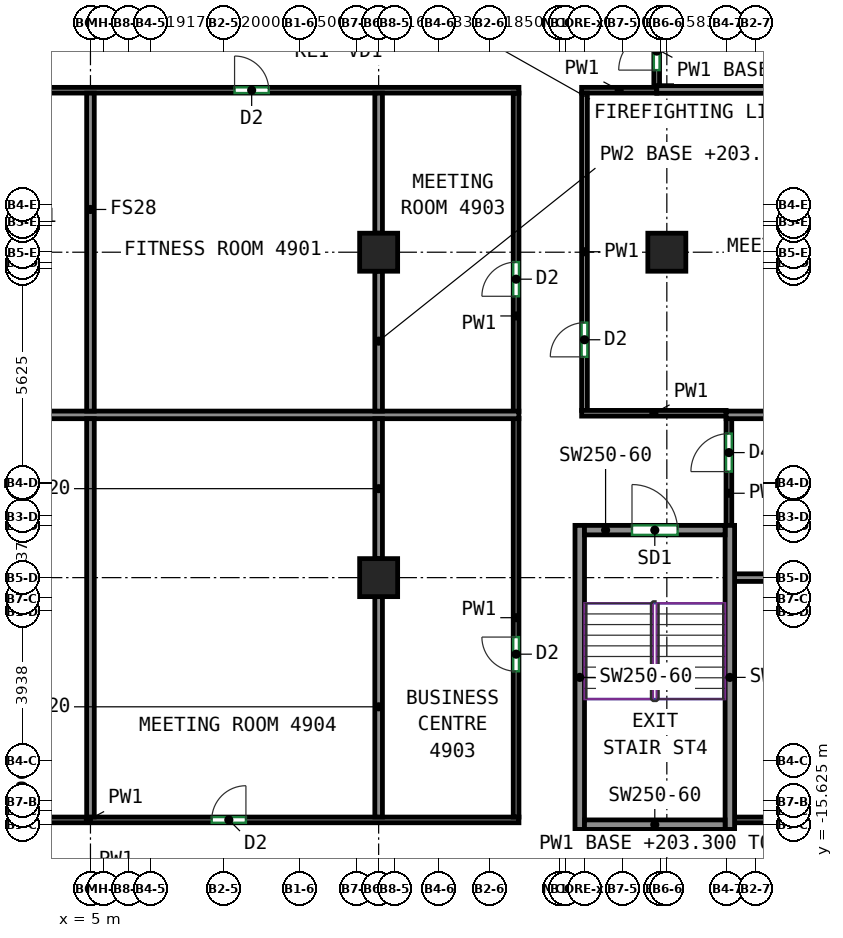
"""IFC4 building model, lengths in metres.
Left out: names, types, materials, properties, quantities, classifications, styles, units other than length and angle.
Written with IfcOpenShell. Run it as: python <this file> out.ifc"""

import sys

from ifc_helpers import new_model, si_unit, direction, frame, frame_2d, origin, origin_2d, place, context, subcontext, project, spatial, rectangle, extrude, source, transform, mapped, element, fill, save


model = new_model("IFC4")
c1 = context("Model", 3, precision=1e-05, world=origin(), true_north=direction((0.0, 1.0)))
c2 = subcontext(c1, "Body", "Model", "MODEL_VIEW")
j1 = project(units=[si_unit("LENGTHUNIT", "METRE"), si_unit("PLANEANGLEUNIT", "RADIAN")], contexts=[c1])
p1 = place(None, origin())
s1 = spatial("IfcSite", under=j1, at=p1, CompositionType="ELEMENT")
p2 = place(p1, origin())
s2 = spatial("IfcBuilding", under=s1, at=p2, CompositionType="ELEMENT")
p3 = place(p2, frame((0.0, 0.0, 203.3)))
s3 = spatial("IfcBuildingStorey", under=s2, at=p3, CompositionType="ELEMENT", Elevation=203.3)
m1 = source(origin(), c2, "Body", "SweptSolid", [
    extrude(rectangle(XDim=1.0, YDim=1.0, at=origin_2d()), origin(), (0.0, 0.0, 1.0), 3.12),
])
for number, where, z_axis, x_axis in (
    (1, (12.583, -9.125, 0.0), (0.0, 0.0, 1.0), (1.0, 0.0, 0.0)),
    (2, (12.583, -0.562, 0.0), (0.0, 0.0, 1.0), (1.0, 0.0, 0.0)),
    (3, (20.167, -0.562, 0.0), (0.0, 0.0, 1.0), (1.0, 0.0, 0.0)),
):
    element("IfcColumn", number, at=place(p3, frame(where, z_axis=z_axis, x_axis=x_axis)), inside=s3, PredefinedType="COLUMN", context=c2, shape_type="MappedRepresentation", body=[
        mapped(m1, transform((0.0, 0.0, 0.0))),
    ])
m2 = source(origin(), c2, "Body", "SweptSolid", [
    extrude(rectangle(XDim=8.0, YDim=0.25, at=frame_2d((4.0, 0.0))), origin(), (0.0, 0.0, 1.0), 3.12),
])
for number, where, z_axis, x_axis in (
    (4, (17.875, -15.75, 0.0), (0.0, 0.0, 1.0), (0.0, 1.0, 0.0)),
    (5, (21.825, -15.75, 0.0), (0.0, 0.0, 1.0), (0.0, 1.0, 0.0)),
):
    element("IfcWall", number, at=place(p3, frame(where, z_axis=z_axis, x_axis=x_axis)), inside=s3, PredefinedType="SHEAR", context=c2, shape_type="MappedRepresentation", body=[
        mapped(m2, transform((0.0, 0.0, 0.0))),
    ])
m3 = source(origin(), c2, "Body", "SweptSolid", [
    extrude(rectangle(XDim=3.7, YDim=0.25, at=frame_2d((1.85, 0.0))), origin(), (0.0, 0.0, 1.0), 3.12),
])
p4 = place(p3, frame((18.0, -15.625, 0.0), z_axis=(0.0, 0.0, 1.0), x_axis=(1.0, 0.0, 0.0)))
e6 = element("IfcWall", 6, at=p4, inside=s3, PredefinedType="SHEAR", context=c2, shape_type="MappedRepresentation", body=[
    mapped(m3, transform((0.0, 0.0, 0.0))),
])
p5 = place(p3, frame((18.0, -7.875, 0.0), z_axis=(0.0, 0.0, 1.0), x_axis=(1.0, 0.0, 0.0)))
e7 = element("IfcWall", 7, at=p5, inside=s3, PredefinedType="SHEAR", context=c2, shape_type="MappedRepresentation", body=[
    mapped(m3, transform((0.0, 0.0, 0.0))),
])
p6 = place(p5, frame((1.25, 0.0, 0.0)))
e8 = element("IfcOpeningElement", 8, at=p6, cuts=e7, PredefinedType="OPENING", context=c2, shape_type="SweptSolid", body=[
    extrude(rectangle(XDim=1.2, YDim=2.1, at=frame_2d((0.6, 1.05))), frame((0.0, 0.135, 0.0), z_axis=(0.0, -1.0, 0.0), x_axis=(1.0, 0.0, 0.0)), (0.0, 0.0, 1.0), 0.27),
])
p7 = place(p3, frame((19.9, 3.809, 0.0), z_axis=(0.0, 0.0, 1.0), x_axis=(0.0, 1.0, 0.0)))
e9 = element("IfcWall", 9, at=p7, inside=s3, PredefinedType="PARTITIONING", context=c2, shape_type="SweptSolid", body=[
    extrude(rectangle(XDim=1.951, YDim=0.15, at=frame_2d((0.976, 0.0))), origin(), (0.0, 0.0, 1.0), 2.52),
])
p8 = place(p7, frame((0.42, 0.0, 0.0)))
e10 = element("IfcOpeningElement", 10, at=p8, cuts=e9, PredefinedType="OPENING", context=c2, shape_type="SweptSolid", body=[
    extrude(rectangle(XDim=1.0, YDim=2.1, at=frame_2d((0.5, 1.05))), frame((0.0, 0.085, 0.0), z_axis=(0.0, -1.0, 0.0), x_axis=(1.0, 0.0, 0.0)), (0.0, 0.0, 1.0), 0.17),
])
p9 = place(p3, frame((17.925, 3.7, 0.0), z_axis=(0.0, 0.0, 1.0), x_axis=(1.0, 0.0, 0.0)))
e11 = element("IfcWall", 11, at=p9, inside=s3, PredefinedType="PARTITIONING", context=c2, shape_type="SweptSolid", body=[
    extrude(rectangle(XDim=1.975, YDim=0.15, at=frame_2d((0.987, 0.0))), origin(), (0.0, 0.0, 1.0), 3.12),
])
p10 = place(p3, frame((18.0, -4.725, 0.0), z_axis=(0.0, 0.0, 1.0), x_axis=(0.0, 1.0, 0.0)))
e12 = element("IfcWall", 12, at=p10, inside=s3, PredefinedType="PARTITIONING", context=c2, shape_type="SweptSolid", body=[
    extrude(rectangle(XDim=8.35, YDim=0.15, at=frame_2d((4.175, 0.0))), origin(), (0.0, 0.0, 1.0), 3.12),
])
p11 = place(p10, frame((1.409, 0.0, 0.0)))
e13 = element("IfcOpeningElement", 13, at=p11, cuts=e12, PredefinedType="OPENING", context=c2, shape_type="SweptSolid", body=[
    extrude(rectangle(XDim=0.9, YDim=2.1, at=frame_2d((0.45, 1.05))), frame((0.0, 0.085, 0.0), z_axis=(0.0, -1.0, 0.0), x_axis=(1.0, 0.0, 0.0)), (0.0, 0.0, 1.0), 0.17),
])
p12 = place(p3, frame((17.925, -4.8, 0.0), z_axis=(0.0, 0.0, 1.0), x_axis=(1.0, 0.0, 0.0)))
e14 = element("IfcWall", 14, at=p12, inside=s3, PredefinedType="PARTITIONING", context=c2, shape_type="SweptSolid", body=[
    extrude(rectangle(XDim=3.802, YDim=0.15, at=frame_2d((1.901, 0.0))), origin(), (0.0, 0.0, 1.0), 3.12),
])
p13 = place(p3, frame((21.8, -7.75, 0.0), z_axis=(0.0, 0.0, 1.0), x_axis=(0.0, 1.0, 0.0)))
e15 = element("IfcWall", 15, at=p13, inside=s3, PredefinedType="PARTITIONING", context=c2, shape_type="SweptSolid", body=[
    extrude(rectangle(XDim=2.817, YDim=0.15, at=frame_2d((1.408, 0.0))), origin(), (0.0, 0.0, 1.0), 3.12),
])
p14 = place(p13, frame((1.415, 0.0, 0.0)))
e16 = element("IfcOpeningElement", 16, at=p14, cuts=e15, PredefinedType="OPENING", context=c2, shape_type="SweptSolid", body=[
    extrude(rectangle(XDim=1.0, YDim=2.1, at=frame_2d((0.5, 1.05))), frame((0.0, 0.085, 0.0), z_axis=(0.0, -1.0, 0.0), x_axis=(1.0, 0.0, 0.0)), (0.0, 0.0, 1.0), 0.17),
])
p15 = place(p3, frame((21.95, -15.5, 0.0), z_axis=(0.0, 0.0, 1.0), x_axis=(1.0, 0.0, 0.0)))
e17 = element("IfcWall", 17, at=p15, inside=s3, PredefinedType="PARTITIONING", context=c2, shape_type="SweptSolid", body=[
    extrude(rectangle(XDim=5.875, YDim=0.15, at=frame_2d((2.938, 0.0))), origin(), (0.0, 0.0, 1.0), 3.12),
])
p16 = place(p15, frame((3.962, 0.0, 0.0)))
e18 = element("IfcOpeningElement", 18, at=p16, cuts=e17, PredefinedType="OPENING", context=c2, shape_type="SweptSolid", body=[
    extrude(rectangle(XDim=0.9, YDim=2.1, at=frame_2d((0.45, 1.05))), frame((0.0, 0.085, 0.0), z_axis=(0.0, -1.0, 0.0), x_axis=(1.0, 0.0, 0.0)), (0.0, 0.0, 1.0), 0.17),
])
p17 = place(p3, frame((-17.575, 3.7, 0.0), z_axis=(0.0, 0.0, 1.0), x_axis=(1.0, 0.0, 0.0)))
e19 = element("IfcWall", 19, at=p17, inside=s3, PredefinedType="PARTITIONING", context=c2, shape_type="SweptSolid", body=[
    extrude(rectangle(XDim=33.85, YDim=0.15, at=frame_2d((16.925, 0.0))), origin(), (0.0, 0.0, 1.0), 3.12),
])
p18 = place(p17, frame((10.0, 0.0, 0.0)))
e20 = element("IfcOpeningElement", 20, at=p18, cuts=e19, PredefinedType="OPENING", context=c2, shape_type="SweptSolid", body=[
    extrude(rectangle(XDim=0.9, YDim=2.1, at=frame_2d((0.45, 1.05))), frame((0.0, 0.085, 0.0), z_axis=(0.0, -1.0, 0.0), x_axis=(1.0, 0.0, 0.0)), (0.0, 0.0, 1.0), 0.17),
])
p19 = place(p17, frame((15.182, 0.0, 0.0)))
e21 = element("IfcOpeningElement", 21, at=p19, cuts=e19, PredefinedType="OPENING", context=c2, shape_type="SweptSolid", body=[
    extrude(rectangle(XDim=0.9, YDim=2.1, at=frame_2d((0.45, 1.05))), frame((0.0, 0.085, 0.0), z_axis=(0.0, -1.0, 0.0), x_axis=(1.0, 0.0, 0.0)), (0.0, 0.0, 1.0), 0.17),
])
p20 = place(p17, frame((26.367, 0.0, 0.0)))
e22 = element("IfcOpeningElement", 22, at=p20, cuts=e19, PredefinedType="OPENING", context=c2, shape_type="SweptSolid", body=[
    extrude(rectangle(XDim=0.9, YDim=2.1, at=frame_2d((0.45, 1.05))), frame((0.0, 0.085, 0.0), z_axis=(0.0, -1.0, 0.0), x_axis=(1.0, 0.0, 0.0)), (0.0, 0.0, 1.0), 0.17),
])
p21 = place(p3, frame((16.2, -4.753, 0.0), z_axis=(0.0, 0.0, 1.0), x_axis=(0.0, 1.0, 0.0)))
e23 = element("IfcWall", 23, at=p21, inside=s3, PredefinedType="PARTITIONING", context=c2, shape_type="SweptSolid", body=[
    extrude(rectangle(XDim=8.378, YDim=0.15, at=frame_2d((4.189, 0.0))), origin(), (0.0, 0.0, 1.0), 3.12),
])
p22 = place(p21, frame((3.031, 0.0, 0.0)))
e24 = element("IfcOpeningElement", 24, at=p22, cuts=e23, PredefinedType="OPENING", context=c2, shape_type="SweptSolid", body=[
    extrude(rectangle(XDim=0.9, YDim=2.1, at=frame_2d((0.45, 1.05))), frame((0.0, 0.085, 0.0), z_axis=(0.0, -1.0, 0.0), x_axis=(1.0, 0.0, 0.0)), (0.0, 0.0, 1.0), 0.17),
])
p23 = place(p3, frame((-6.385, -15.5, 0.0), z_axis=(0.0, 0.0, 1.0), x_axis=(1.0, 0.0, 0.0)))
e25 = element("IfcWall", 25, at=p23, inside=s3, PredefinedType="PARTITIONING", context=c2, shape_type="SweptSolid", body=[
    extrude(rectangle(XDim=22.66, YDim=0.15, at=frame_2d((11.33, 0.0))), origin(), (0.0, 0.0, 1.0), 3.12),
])
p24 = place(p23, frame((7.266, 0.0, 0.0)))
e26 = element("IfcOpeningElement", 26, at=p24, cuts=e25, PredefinedType="OPENING", context=c2, shape_type="SweptSolid", body=[
    extrude(rectangle(XDim=0.9, YDim=2.1, at=frame_2d((0.45, 1.05))), frame((0.0, 0.085, 0.0), z_axis=(0.0, -1.0, 0.0), x_axis=(1.0, 0.0, 0.0)), (0.0, 0.0, 1.0), 0.17),
])
p25 = place(p23, frame((14.576, 0.0, 0.0)))
e27 = element("IfcOpeningElement", 27, at=p25, cuts=e25, PredefinedType="OPENING", context=c2, shape_type="SweptSolid", body=[
    extrude(rectangle(XDim=0.9, YDim=2.1, at=frame_2d((0.45, 1.05))), frame((0.0, 0.085, 0.0), z_axis=(0.0, -1.0, 0.0), x_axis=(1.0, 0.0, 0.0)), (0.0, 0.0, 1.0), 0.17),
])
p26 = place(p3, frame((16.2, -15.425, 0.0), z_axis=(0.0, 0.0, 1.0), x_axis=(0.0, 1.0, 0.0)))
e28 = element("IfcWall", 28, at=p26, inside=s3, PredefinedType="PARTITIONING", context=c2, shape_type="SweptSolid", body=[
    extrude(rectangle(XDim=10.492, YDim=0.15, at=frame_2d((5.246, 0.0))), origin(), (0.0, 0.0, 1.0), 3.12),
])
p27 = place(p26, frame((3.836, 0.0, 0.0)))
e29 = element("IfcOpeningElement", 29, at=p27, cuts=e28, PredefinedType="OPENING", context=c2, shape_type="SweptSolid", body=[
    extrude(rectangle(XDim=0.9, YDim=2.1, at=frame_2d((0.45, 1.05))), frame((0.0, 0.085, 0.0), z_axis=(0.0, -1.0, 0.0), x_axis=(1.0, 0.0, 0.0)), (0.0, 0.0, 1.0), 0.17),
])
p28 = place(p3, frame((19.902, 3.719, 0.0), z_axis=(0.0, 0.0, 1.0), x_axis=(1.0, 0.0, 0.0)))
e30 = element("IfcWall", 30, at=p28, inside=s3, PredefinedType="PARTITIONING", context=c2, shape_type="SweptSolid", body=[
    extrude(rectangle(XDim=11.098, YDim=0.2, at=frame_2d((5.549, 0.0))), origin(), (0.0, 0.0, 1.0), 3.12),
])
p29 = place(p3, frame((21.727, -4.843, 0.0), z_axis=(0.0, 0.0, 1.0), x_axis=(1.0, 0.0, 0.0)))
e31 = element("IfcWall", 31, at=p29, inside=s3, PredefinedType="PARTITIONING", context=c2, shape_type="SweptSolid", body=[
    extrude(rectangle(XDim=9.273, YDim=0.2, at=frame_2d((4.636, 0.0))), origin(), (0.0, 0.0, 1.0), 3.12),
])
p30 = place(p3, frame((21.95, -9.125, 0.0), z_axis=(0.0, 0.0, 1.0), x_axis=(1.0, 0.0, 0.0)))
e32 = element("IfcWall", 32, at=p30, inside=s3, PredefinedType="PARTITIONING", context=c2, shape_type="SweptSolid", body=[
    extrude(rectangle(XDim=8.475, YDim=0.2, at=frame_2d((4.238, 0.0))), origin(), (0.0, 0.0, 1.0), 3.12),
])
p31 = place(p3, frame((-13.873, -4.843, 0.0), z_axis=(0.0, 0.0, 1.0), x_axis=(1.0, 0.0, 0.0)))
e33 = element("IfcWall", 33, at=p31, inside=s3, PredefinedType="PARTITIONING", context=c2, shape_type="SweptSolid", body=[
    extrude(rectangle(XDim=30.146, YDim=0.2, at=frame_2d((15.073, 0.0))), origin(), (0.0, 0.0, 1.0), 3.12),
])
p32 = place(p3, frame((5.0, -4.743, 0.0), z_axis=(0.0, 0.0, 1.0), x_axis=(0.0, 1.0, 0.0)))
e34 = element("IfcWall", 34, at=p32, inside=s3, PredefinedType="PARTITIONING", context=c2, shape_type="SweptSolid", body=[
    extrude(rectangle(XDim=8.366, YDim=0.2, at=frame_2d((4.183, 0.0))), origin(), (0.0, 0.0, 1.0), 3.12),
])
p33 = place(p3, frame((12.583, -0.062, 0.0), z_axis=(0.0, 0.0, 1.0), x_axis=(0.0, 1.0, 0.0)))
e35 = element("IfcWall", 35, at=p33, inside=s3, PredefinedType="PARTITIONING", context=c2, shape_type="SweptSolid", body=[
    extrude(rectangle(XDim=3.685, YDim=0.2, at=frame_2d((1.843, 0.0))), origin(), (0.0, 0.0, 1.0), 3.12),
])
p34 = place(p3, frame((12.583, -4.743, 0.0), z_axis=(0.0, 0.0, 1.0), x_axis=(0.0, 1.0, 0.0)))
e36 = element("IfcWall", 36, at=p34, inside=s3, PredefinedType="PARTITIONING", context=c2, shape_type="SweptSolid", body=[
    extrude(rectangle(XDim=3.681, YDim=0.2, at=frame_2d((1.84, 0.0))), origin(), (0.0, 0.0, 1.0), 2.52),
])
p35 = place(p3, frame((5.0, -15.423, 0.0), z_axis=(0.0, 0.0, 1.0), x_axis=(0.0, 1.0, 0.0)))
e37 = element("IfcWall", 37, at=p35, inside=s3, PredefinedType="PARTITIONING", context=c2, shape_type="SweptSolid", body=[
    extrude(rectangle(XDim=10.48, YDim=0.2, at=frame_2d((5.24, 0.0))), origin(), (0.0, 0.0, 1.0), 3.12),
])
p36 = place(p3, frame((12.583, -8.625, 0.0), z_axis=(0.0, 0.0, 1.0), x_axis=(0.0, 1.0, 0.0)))
e38 = element("IfcWall", 38, at=p36, inside=s3, PredefinedType="PARTITIONING", context=c2, shape_type="SweptSolid", body=[
    extrude(rectangle(XDim=3.682, YDim=0.2, at=frame_2d((1.841, 0.0))), origin(), (0.0, 0.0, 1.0), 2.52),
])
p37 = place(p3, frame((12.583, -15.423, 0.0), z_axis=(0.0, 0.0, 1.0), x_axis=(0.0, 1.0, 0.0)))
e39 = element("IfcWall", 39, at=p37, inside=s3, PredefinedType="PARTITIONING", context=c2, shape_type="SweptSolid", body=[
    extrude(rectangle(XDim=5.798, YDim=0.2, at=frame_2d((2.899, 0.0))), origin(), (0.0, 0.0, 1.0), 2.52),
])
p38 = place(p6, origin())
e40 = element("IfcDoor", 40, at=p38, inside=s3, OperationType="DOUBLE_DOOR_SINGLE_SWING", PredefinedType="DOOR", context=c2, shape_type="SweptSolid", body=[
    extrude(rectangle(XDim=1.2, YDim=2.1, at=frame_2d((0.6, 1.05))), frame((0.0, 0.025, 0.0), z_axis=(0.0, -1.0, 0.0), x_axis=(1.0, 0.0, 0.0)), (0.0, 0.0, 1.0), 0.05),
])
fill(e8, e40)
p39 = place(p25, origin())
e41 = element("IfcDoor", 41, at=p39, inside=s3, OperationType="SINGLE_SWING_RIGHT", PredefinedType="DOOR", context=c2, shape_type="SweptSolid", body=[
    extrude(rectangle(XDim=0.9, YDim=2.1, at=frame_2d((0.45, 1.05))), frame((0.0, 0.025, 0.0), z_axis=(0.0, -1.0, 0.0), x_axis=(1.0, 0.0, 0.0)), (0.0, 0.0, 1.0), 0.05),
])
fill(e27, e41)
p40 = place(p27, origin())
e42 = element("IfcDoor", 42, at=p40, inside=s3, OperationType="SINGLE_SWING_RIGHT", PredefinedType="DOOR", context=c2, shape_type="SweptSolid", body=[
    extrude(rectangle(XDim=0.9, YDim=2.1, at=frame_2d((0.45, 1.05))), frame((0.0, 0.025, 0.0), z_axis=(0.0, -1.0, 0.0), x_axis=(1.0, 0.0, 0.0)), (0.0, 0.0, 1.0), 0.05),
])
fill(e29, e42)
p41 = place(p14, origin())
e43 = element("IfcDoor", 43, at=p41, inside=s3, OperationType="SINGLE_SWING_LEFT", PredefinedType="DOOR", context=c2, shape_type="SweptSolid", body=[
    extrude(rectangle(XDim=1.0, YDim=2.1, at=frame_2d((0.5, 1.05))), frame((0.0, 0.025, 0.0), z_axis=(0.0, -1.0, 0.0), x_axis=(1.0, 0.0, 0.0)), (0.0, 0.0, 1.0), 0.05),
])
fill(e16, e43)
p42 = place(p11, origin())
e44 = element("IfcDoor", 44, at=p42, inside=s3, OperationType="SINGLE_SWING_LEFT", PredefinedType="DOOR", context=c2, shape_type="SweptSolid", body=[
    extrude(rectangle(XDim=0.9, YDim=2.1, at=frame_2d((0.45, 1.05))), frame((0.0, 0.025, 0.0), z_axis=(0.0, -1.0, 0.0), x_axis=(1.0, 0.0, 0.0)), (0.0, 0.0, 1.0), 0.05),
])
fill(e13, e44)
p43 = place(p22, origin())
e45 = element("IfcDoor", 45, at=p43, inside=s3, OperationType="SINGLE_SWING_LEFT", PredefinedType="DOOR", context=c2, shape_type="SweptSolid", body=[
    extrude(rectangle(XDim=0.9, YDim=2.1, at=frame_2d((0.45, 1.05))), frame((0.0, 0.025, 0.0), z_axis=(0.0, -1.0, 0.0), x_axis=(1.0, 0.0, 0.0)), (0.0, 0.0, 1.0), 0.05),
])
fill(e24, e45)
p44 = place(p20, origin())
e46 = element("IfcDoor", 46, at=p44, inside=s3, OperationType="SINGLE_SWING_LEFT", PredefinedType="DOOR", context=c2, shape_type="SweptSolid", body=[
    extrude(rectangle(XDim=0.9, YDim=2.1, at=frame_2d((0.45, 1.05))), frame((0.0, 0.025, 0.0), z_axis=(0.0, -1.0, 0.0), x_axis=(1.0, 0.0, 0.0)), (0.0, 0.0, 1.0), 0.05),
])
fill(e22, e46)
p45 = place(p8, origin())
e47 = element("IfcDoor", 47, at=p45, inside=s3, OperationType="SINGLE_SWING_LEFT", PredefinedType="DOOR", context=c2, shape_type="SweptSolid", body=[
    extrude(rectangle(XDim=1.0, YDim=2.1, at=frame_2d((0.5, 1.05))), frame((0.0, 0.025, 0.0), z_axis=(0.0, -1.0, 0.0), x_axis=(1.0, 0.0, 0.0)), (0.0, 0.0, 1.0), 0.05),
])
fill(e10, e47)
save(model, sys.argv[1])
